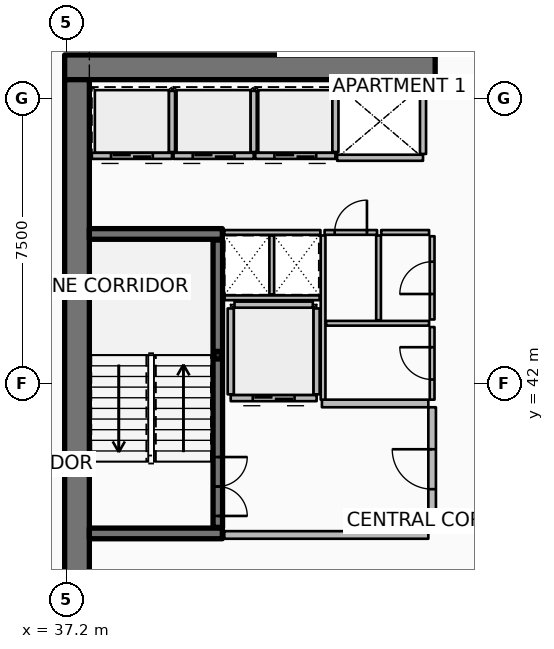
"""IFC4 building model, lengths in metres.
Left out: names, types, materials, properties, quantities, classifications, styles, units other than length and angle.
Written with IfcOpenShell. Run it as: python <this file> out.ifc"""

import sys

from ifc_helpers import new_model, si_unit, direction, frame, frame_2d, origin, origin_2d, place, context, subcontext, project, spatial, rectangle, hollow_rectangle, extrude, element, fill, save


model = new_model("IFC4")
c1 = context("Model", 3, precision=1e-05, world=origin(), true_north=direction((0.0, 1.0)))
c2 = subcontext(c1, "Body", "Model", "MODEL_VIEW")
j1 = project(units=[si_unit("LENGTHUNIT", "METRE"), si_unit("PLANEANGLEUNIT", "RADIAN")], contexts=[c1])
p1 = place(None, origin())
s1 = spatial("IfcSite", under=j1, at=p1, CompositionType="ELEMENT")
p2 = place(p1, origin())
s2 = spatial("IfcBuilding", under=s1, at=p2, CompositionType="ELEMENT")
p3 = place(p2, frame((0.0, 0.0, 202.8)))
s3 = spatial("IfcBuildingStorey", under=s2, at=p3, CompositionType="ELEMENT", Elevation=202.8)
p4 = place(p3, frame((37.15, 50.325, 0.0), z_axis=(0.0, 0.0, 1.0), x_axis=(1.0, 0.0, 0.0)))
e1 = element("IfcWall", 1, at=p4, inside=s3, PredefinedType="SHEAR", context=c2, shape_type="SweptSolid", body=[
    extrude(rectangle(XDim=9.75, YDim=0.65, at=frame_2d((4.875, 0.0))), origin(), (0.0, 0.0, 1.0), 3.75),
])
p5 = place(p3, frame((37.475, 34.0, 0.0), z_axis=(0.0, 0.0, 1.0), x_axis=(0.0, 1.0, 0.0)))
e2 = element("IfcWall", 2, at=p5, inside=s3, PredefinedType="SHEAR", context=c2, shape_type="SweptSolid", body=[
    extrude(rectangle(XDim=16.0, YDim=0.65, at=frame_2d((8.0, 0.0))), origin(), (0.0, 0.0, 1.0), 3.75),
])
for number, where, z_axis, x_axis in (
    (3, (37.8, 38.06, 0.0), (0.0, 0.0, 1.0), (1.0, 0.0, 0.0)),
    (4, (37.8, 45.94, 0.0), (0.0, 0.0, 1.0), (1.0, 0.0, 0.0)),
):
    element("IfcWall", number, at=place(p3, frame(where, z_axis=z_axis, x_axis=x_axis)), inside=s3, PredefinedType="SHEAR", context=c2, shape_type="SweptSolid", body=[
        extrude(rectangle(XDim=3.5, YDim=0.28, at=frame_2d((1.75, 0.0))), origin(), (0.0, 0.0, 1.0), 3.75),
    ])
p6 = place(p3, frame((41.18, 42.75, 0.0), z_axis=(0.0, 0.0, 1.0), x_axis=(1.0, 0.0, 0.0)))
e5 = element("IfcColumn", 5, at=p6, inside=s3, PredefinedType="COLUMN", context=c2, shape_type="SweptSolid", body=[
    extrude(hollow_rectangle(XDim=0.2, YDim=0.2, WallThickness=0.01, InnerFilletRadius=0.01, OuterFilletRadius=0.02, at=origin_2d()), origin(), (0.0, 0.0, 1.0), 1.67),
])
p7 = place(p3, frame((41.18, 38.22, 0.0), z_axis=(0.0, 0.0, 1.0), x_axis=(0.0, 1.0, 0.0)))
e6 = element("IfcWall", 6, at=p7, inside=s3, PredefinedType="SOLIDWALL", context=c2, shape_type="SweptSolid", body=[
    extrude(rectangle(XDim=7.56, YDim=0.25, at=frame_2d((3.78, 0.0))), origin(), (0.0, 0.0, 1.0), 3.5),
])
p8 = place(p7, frame((0.3, 0.0, 0.0)))
e7 = element("IfcOpeningElement", 7, at=p8, cuts=e6, PredefinedType="OPENING", context=c2, shape_type="SweptSolid", body=[
    extrude(rectangle(XDim=1.55, YDim=2.15, at=frame_2d((0.775, 1.075))), frame((0.0, 0.135, 0.0), z_axis=(0.0, -1.0, 0.0), x_axis=(1.0, 0.0, 0.0)), (0.0, 0.0, 1.0), 0.27),
])
p9 = place(p3, frame((39.975, 47.995, 0.0), z_axis=(0.0, 0.0, 1.0), x_axis=(-1.0, 0.0, 0.0)))
e8 = element("IfcWall", 8, at=p9, inside=s3, PredefinedType="PARTITIONING", context=c2, shape_type="SweptSolid", body=[
    extrude(rectangle(XDim=2.11, YDim=0.16, at=frame_2d((1.055, 0.0))), origin(), (0.0, 0.0, 1.0), 3.5),
])
p10 = place(p9, frame((0.505, 0.0, 0.0)))
e9 = element("IfcOpeningElement", 9, at=p10, cuts=e8, PredefinedType="OPENING", context=c2, shape_type="SweptSolid", body=[
    extrude(rectangle(XDim=1.1, YDim=2.1, at=frame_2d((0.55, 1.05))), frame((0.0, 0.09, 0.0), z_axis=(0.0, -1.0, 0.0), x_axis=(1.0, 0.0, 0.0)), (0.0, 0.0, 1.0), 0.18),
])
p11 = place(p3, frame((39.975, 48.095, 0.0), z_axis=(0.0, 0.0, 1.0), x_axis=(0.0, 1.0, 0.0)))
e10 = element("IfcWall", 10, at=p11, inside=s3, PredefinedType="PARTITIONING", context=c2, shape_type="SweptSolid", body=[
    extrude(rectangle(XDim=1.61, YDim=0.16, at=frame_2d((0.805, 0.0))), origin(), (0.0, 0.0, 1.0), 3.5),
])
p12 = place(p3, frame((42.125, 47.995, 0.0), z_axis=(0.0, 0.0, 1.0), x_axis=(-1.0, 0.0, 0.0)))
e11 = element("IfcWall", 11, at=p12, inside=s3, PredefinedType="PARTITIONING", context=c2, shape_type="SweptSolid", body=[
    extrude(rectangle(XDim=2.11, YDim=0.16, at=frame_2d((1.055, 0.0))), origin(), (0.0, 0.0, 1.0), 3.5),
])
p13 = place(p12, frame((0.505, 0.0, 0.0)))
e12 = element("IfcOpeningElement", 12, at=p13, cuts=e11, PredefinedType="OPENING", context=c2, shape_type="SweptSolid", body=[
    extrude(rectangle(XDim=1.1, YDim=2.1, at=frame_2d((0.55, 1.05))), frame((0.0, 0.09, 0.0), z_axis=(0.0, -1.0, 0.0), x_axis=(1.0, 0.0, 0.0)), (0.0, 0.0, 1.0), 0.18),
])
p14 = place(p3, frame((42.125, 48.095, 0.0), z_axis=(0.0, 0.0, 1.0), x_axis=(0.0, 1.0, 0.0)))
e13 = element("IfcWall", 13, at=p14, inside=s3, PredefinedType="PARTITIONING", context=c2, shape_type="SweptSolid", body=[
    extrude(rectangle(XDim=1.61, YDim=0.16, at=frame_2d((0.805, 0.0))), origin(), (0.0, 0.0, 1.0), 3.5),
])
p15 = place(p3, frame((44.275, 47.995, 0.0), z_axis=(0.0, 0.0, 1.0), x_axis=(-1.0, 0.0, 0.0)))
e14 = element("IfcWall", 14, at=p15, inside=s3, PredefinedType="PARTITIONING", context=c2, shape_type="SweptSolid", body=[
    extrude(rectangle(XDim=2.11, YDim=0.16, at=frame_2d((1.055, 0.0))), origin(), (0.0, 0.0, 1.0), 3.5),
])
p16 = place(p15, frame((0.505, 0.0, 0.0)))
e15 = element("IfcOpeningElement", 15, at=p16, cuts=e14, PredefinedType="OPENING", context=c2, shape_type="SweptSolid", body=[
    extrude(rectangle(XDim=1.1, YDim=2.1, at=frame_2d((0.55, 1.05))), frame((0.0, 0.09, 0.0), z_axis=(0.0, -1.0, 0.0), x_axis=(1.0, 0.0, 0.0)), (0.0, 0.0, 1.0), 0.18),
])
p17 = place(p3, frame((44.275, 48.095, 0.0), z_axis=(0.0, 0.0, 1.0), x_axis=(0.0, 1.0, 0.0)))
e16 = element("IfcWall", 16, at=p17, inside=s3, PredefinedType="PARTITIONING", context=c2, shape_type="SweptSolid", body=[
    extrude(rectangle(XDim=1.61, YDim=0.16, at=frame_2d((0.805, 0.0))), origin(), (0.0, 0.0, 1.0), 3.5),
])
p18 = place(p3, frame((46.58, 47.945, 0.0), z_axis=(0.0, 0.0, 1.0), x_axis=(-1.0, 0.0, 0.0)))
e17 = element("IfcWall", 17, at=p18, inside=s3, PredefinedType="PARTITIONING", context=c2, shape_type="SweptSolid", body=[
    extrude(rectangle(XDim=2.26, YDim=0.16, at=frame_2d((1.13, 0.0))), origin(), (0.0, 0.0, 1.0), 3.5),
])
p19 = place(p3, frame((46.58, 48.045, 0.0), z_axis=(0.0, 0.0, 1.0), x_axis=(0.0, 1.0, 0.0)))
e18 = element("IfcWall", 18, at=p19, inside=s3, PredefinedType="PARTITIONING", context=c2, shape_type="SweptSolid", body=[
    extrude(rectangle(XDim=1.71, YDim=0.16, at=frame_2d((0.855, 0.0))), origin(), (0.0, 0.0, 1.0), 3.5),
])
p20 = place(p3, frame((43.78, 41.62, 0.0), z_axis=(0.0, 0.0, 1.0), x_axis=(-1.0, 0.0, 0.0)))
e19 = element("IfcWall", 19, at=p20, inside=s3, PredefinedType="PARTITIONING", context=c2, shape_type="SweptSolid", body=[
    extrude(rectangle(XDim=2.26, YDim=0.16, at=frame_2d((1.13, 0.0))), origin(), (0.0, 0.0, 1.0), 3.5),
])
p21 = place(p20, frame((0.58, 0.0, 0.0)))
e20 = element("IfcOpeningElement", 20, at=p21, cuts=e19, PredefinedType="OPENING", context=c2, shape_type="SweptSolid", body=[
    extrude(rectangle(XDim=1.1, YDim=2.1, at=frame_2d((0.55, 1.05))), frame((0.0, 0.09, 0.0), z_axis=(0.0, -1.0, 0.0), x_axis=(1.0, 0.0, 0.0)), (0.0, 0.0, 1.0), 0.18),
])
for number, where, z_axis, x_axis in (
    (21, (43.78, 41.72, 0.0), (0.0, 0.0, 1.0), (0.0, 1.0, 0.0)),
    (22, (41.52, 41.72, 0.0), (0.0, 0.0, 1.0), (0.0, 1.0, 0.0)),
):
    element("IfcWall", number, at=place(p3, frame(where, z_axis=z_axis, x_axis=x_axis)), inside=s3, PredefinedType="PARTITIONING", context=c2, shape_type="SweptSolid", body=[
        extrude(rectangle(XDim=2.26, YDim=0.16, at=frame_2d((1.13, 0.0))), origin(), (0.0, 0.0, 1.0), 3.5),
    ])
p22 = place(p3, frame((41.62, 44.08, 0.0), z_axis=(0.0, 0.0, 1.0), x_axis=(1.0, 0.0, 0.0)))
e23 = element("IfcWall", 23, at=p22, inside=s3, PredefinedType="PARTITIONING", context=c2, shape_type="SweptSolid", body=[
    extrude(rectangle(XDim=2.06, YDim=0.16, at=frame_2d((1.03, 0.0))), origin(), (0.0, 0.0, 1.0), 3.5),
])
p23 = place(p3, frame((41.35, 38.02, 0.0), z_axis=(0.0, 0.0, 1.0), x_axis=(1.0, 0.0, 0.0)))
e24 = element("IfcWall", 24, at=p23, inside=s3, PredefinedType="PARTITIONING", context=c2, shape_type="SweptSolid", body=[
    extrude(rectangle(XDim=5.37, YDim=0.2, at=frame_2d((2.685, 0.0))), origin(), (0.0, 0.0, 1.0), 3.5),
])
p24 = place(p3, frame((43.92, 41.48, 0.0), z_axis=(0.0, 0.0, 1.0), x_axis=(1.0, 0.0, 0.0)))
e25 = element("IfcWall", 25, at=p24, inside=s3, PredefinedType="PARTITIONING", context=c2, shape_type="SweptSolid", body=[
    extrude(rectangle(XDim=2.8, YDim=0.2, at=frame_2d((1.4, 0.0))), origin(), (0.0, 0.0, 1.0), 3.5),
])
p25 = place(p3, frame((46.82, 38.12, 0.0), z_axis=(0.0, 0.0, 1.0), x_axis=(0.0, 1.0, 0.0)))
e26 = element("IfcWall", 26, at=p25, inside=s3, PredefinedType="PARTITIONING", context=c2, shape_type="SweptSolid", body=[
    extrude(rectangle(XDim=3.26, YDim=0.2, at=frame_2d((1.63, 0.0))), origin(), (0.0, 0.0, 1.0), 3.5),
])
p26 = place(p25, frame((1.105, 0.0, 0.0)))
e27 = element("IfcOpeningElement", 27, at=p26, cuts=e26, PredefinedType="OPENING", context=c2, shape_type="SweptSolid", body=[
    extrude(rectangle(XDim=1.05, YDim=2.1, at=frame_2d((0.525, 1.05))), frame((0.0, 0.11, 0.0), z_axis=(0.0, -1.0, 0.0), x_axis=(1.0, 0.0, 0.0)), (0.0, 0.0, 1.0), 0.22),
])
p27 = place(p3, frame((41.36, 44.26, 0.0), z_axis=(0.0, 0.0, 1.0), x_axis=(1.0, 0.0, 0.0)))
e28 = element("IfcWall", 28, at=p27, inside=s3, PredefinedType="PARTITIONING", context=c2, shape_type="SweptSolid", body=[
    extrude(rectangle(XDim=2.5, YDim=0.125, at=frame_2d((1.25, 0.0))), origin(), (0.0, 0.0, 1.0), 2.94),
])
p28 = place(p3, frame((42.6, 44.35, 0.0), z_axis=(0.0, 0.0, 1.0), x_axis=(0.0, 1.0, 0.0)))
e29 = element("IfcWall", 29, at=p28, inside=s3, PredefinedType="PARTITIONING", context=c2, shape_type="SweptSolid", body=[
    extrude(rectangle(XDim=1.55, YDim=0.125, at=frame_2d((0.775, 0.0))), origin(), (0.0, 0.0, 1.0), 2.94),
])
p29 = place(p3, frame((43.95, 41.58, 0.0), z_axis=(0.0, 0.0, 1.0), x_axis=(0.0, 1.0, 0.0)))
e30 = element("IfcWall", 30, at=p29, inside=s3, PredefinedType="PARTITIONING", context=c2, shape_type="SweptSolid", body=[
    extrude(rectangle(XDim=4.32, YDim=0.125, at=frame_2d((2.16, 0.0))), origin(), (0.0, 0.0, 1.0), 2.94),
])
p30 = place(p3, frame((44.03, 43.59, 0.0), z_axis=(0.0, 0.0, 1.0), x_axis=(1.0, 0.0, 0.0)))
e31 = element("IfcWall", 31, at=p30, inside=s3, PredefinedType="PARTITIONING", context=c2, shape_type="SweptSolid", body=[
    extrude(rectangle(XDim=2.71, YDim=0.125, at=frame_2d((1.355, 0.0))), origin(), (0.0, 0.0, 1.0), 2.94),
])
p31 = place(p3, frame((45.41, 43.67, 0.0), z_axis=(0.0, 0.0, 1.0), x_axis=(0.0, 1.0, 0.0)))
e32 = element("IfcWall", 32, at=p31, inside=s3, PredefinedType="PARTITIONING", context=c2, shape_type="SweptSolid", body=[
    extrude(rectangle(XDim=2.23, YDim=0.125, at=frame_2d((1.115, 0.0))), origin(), (0.0, 0.0, 1.0), 2.94),
])
p32 = place(p3, frame((46.82, 41.58, 0.0), z_axis=(0.0, 0.0, 1.0), x_axis=(0.0, 1.0, 0.0)))
e33 = element("IfcWall", 33, at=p32, inside=s3, PredefinedType="PARTITIONING", context=c2, shape_type="SweptSolid", body=[
    extrude(rectangle(XDim=1.91, YDim=0.125, at=frame_2d((0.955, 0.0))), origin(), (0.0, 0.0, 1.0), 2.94),
])
p33 = place(p32, frame((0.53, 0.0, 0.0)))
e34 = element("IfcOpeningElement", 34, at=p33, cuts=e33, PredefinedType="OPENING", context=c2, shape_type="SweptSolid", body=[
    extrude(rectangle(XDim=0.85, YDim=2.06, at=frame_2d((0.425, 1.03))), frame((0.0, 0.073, 0.0), z_axis=(0.0, -1.0, 0.0), x_axis=(1.0, 0.0, 0.0)), (0.0, 0.0, 1.0), 0.145),
])
p34 = place(p3, frame((46.82, 43.69, 0.0), z_axis=(0.0, 0.0, 1.0), x_axis=(0.0, 1.0, 0.0)))
e35 = element("IfcWall", 35, at=p34, inside=s3, PredefinedType="PARTITIONING", context=c2, shape_type="SweptSolid", body=[
    extrude(rectangle(XDim=2.19, YDim=0.125, at=frame_2d((1.095, 0.0))), origin(), (0.0, 0.0, 1.0), 2.94),
])
p35 = place(p34, frame((0.67, 0.0, 0.0)))
e36 = element("IfcOpeningElement", 36, at=p35, cuts=e35, PredefinedType="OPENING", context=c2, shape_type="SweptSolid", body=[
    extrude(rectangle(XDim=0.85, YDim=2.06, at=frame_2d((0.425, 1.03))), frame((0.0, 0.073, 0.0), z_axis=(0.0, -1.0, 0.0), x_axis=(1.0, 0.0, 0.0)), (0.0, 0.0, 1.0), 0.145),
])
p36 = place(p3, frame((41.35, 45.98, 0.0), z_axis=(0.0, 0.0, 1.0), x_axis=(1.0, 0.0, 0.0)))
e37 = element("IfcWall", 37, at=p36, inside=s3, PredefinedType="PARTITIONING", context=c2, shape_type="SweptSolid", body=[
    extrude(rectangle(XDim=2.53, YDim=0.125, at=frame_2d((1.265, 0.0))), origin(), (0.0, 0.0, 1.0), 2.94),
])
p37 = place(p3, frame((43.99, 45.98, 0.0), z_axis=(0.0, 0.0, 1.0), x_axis=(1.0, 0.0, 0.0)))
e38 = element("IfcWall", 38, at=p37, inside=s3, PredefinedType="PARTITIONING", context=c2, shape_type="SweptSolid", body=[
    extrude(rectangle(XDim=1.38, YDim=0.125, at=frame_2d((0.69, 0.0))), origin(), (0.0, 0.0, 1.0), 2.94),
])
p38 = place(p37, frame((0.265, 0.0, 0.0)))
e39 = element("IfcOpeningElement", 39, at=p38, cuts=e38, PredefinedType="OPENING", context=c2, shape_type="SweptSolid", body=[
    extrude(rectangle(XDim=0.85, YDim=2.06, at=frame_2d((0.425, 1.03))), frame((0.0, 0.073, 0.0), z_axis=(0.0, -1.0, 0.0), x_axis=(1.0, 0.0, 0.0)), (0.0, 0.0, 1.0), 0.145),
])
p39 = place(p3, frame((45.48, 45.98, 0.0), z_axis=(0.0, 0.0, 1.0), x_axis=(1.0, 0.0, 0.0)))
e40 = element("IfcWall", 40, at=p39, inside=s3, PredefinedType="PARTITIONING", context=c2, shape_type="SweptSolid", body=[
    extrude(rectangle(XDim=1.26, YDim=0.125, at=frame_2d((0.63, 0.0))), origin(), (0.0, 0.0, 1.0), 2.94),
])
p40 = place(p8, origin())
e41 = element("IfcDoor", 41, at=p40, inside=s3, OperationType="DOUBLE_DOOR_SINGLE_SWING", PredefinedType="DOOR", context=c2, shape_type="SweptSolid", body=[
    extrude(rectangle(XDim=1.55, YDim=2.15, at=frame_2d((0.775, 1.075))), frame((0.0, 0.025, 0.0), z_axis=(0.0, -1.0, 0.0), x_axis=(1.0, 0.0, 0.0)), (0.0, 0.0, 1.0), 0.05),
])
fill(e7, e41)
p41 = place(p10, origin())
e42 = element("IfcDoor", 42, at=p41, inside=s3, OperationType="DOUBLE_DOOR_SLIDING", PredefinedType="DOOR", context=c2, shape_type="SweptSolid", body=[
    extrude(rectangle(XDim=1.1, YDim=2.1, at=frame_2d((0.55, 1.05))), frame((0.0, 0.025, 0.0), z_axis=(0.0, -1.0, 0.0), x_axis=(1.0, 0.0, 0.0)), (0.0, 0.0, 1.0), 0.05),
])
fill(e9, e42)
p42 = place(p13, origin())
e43 = element("IfcDoor", 43, at=p42, inside=s3, OperationType="DOUBLE_DOOR_SLIDING", PredefinedType="DOOR", context=c2, shape_type="SweptSolid", body=[
    extrude(rectangle(XDim=1.1, YDim=2.1, at=frame_2d((0.55, 1.05))), frame((0.0, 0.025, 0.0), z_axis=(0.0, -1.0, 0.0), x_axis=(1.0, 0.0, 0.0)), (0.0, 0.0, 1.0), 0.05),
])
fill(e12, e43)
p43 = place(p16, origin())
e44 = element("IfcDoor", 44, at=p43, inside=s3, OperationType="DOUBLE_DOOR_SLIDING", PredefinedType="DOOR", context=c2, shape_type="SweptSolid", body=[
    extrude(rectangle(XDim=1.1, YDim=2.1, at=frame_2d((0.55, 1.05))), frame((0.0, 0.025, 0.0), z_axis=(0.0, -1.0, 0.0), x_axis=(1.0, 0.0, 0.0)), (0.0, 0.0, 1.0), 0.05),
])
fill(e15, e44)
p44 = place(p21, origin())
e45 = element("IfcDoor", 45, at=p44, inside=s3, OperationType="DOUBLE_DOOR_SLIDING", PredefinedType="DOOR", context=c2, shape_type="SweptSolid", body=[
    extrude(rectangle(XDim=1.1, YDim=2.1, at=frame_2d((0.55, 1.05))), frame((0.0, 0.025, 0.0), z_axis=(0.0, -1.0, 0.0), x_axis=(1.0, 0.0, 0.0)), (0.0, 0.0, 1.0), 0.05),
])
fill(e20, e45)
p45 = place(p26, origin())
e46 = element("IfcDoor", 46, at=p45, inside=s3, OperationType="SINGLE_SWING_RIGHT", PredefinedType="DOOR", context=c2, shape_type="SweptSolid", body=[
    extrude(rectangle(XDim=1.05, YDim=2.1, at=frame_2d((0.525, 1.05))), frame((0.0, 0.025, 0.0), z_axis=(0.0, -1.0, 0.0), x_axis=(1.0, 0.0, 0.0)), (0.0, 0.0, 1.0), 0.05),
])
fill(e27, e46)
p46 = place(p33, origin())
e47 = element("IfcDoor", 47, at=p46, inside=s3, OperationType="SINGLE_SWING_RIGHT", PredefinedType="DOOR", context=c2, shape_type="SweptSolid", body=[
    extrude(rectangle(XDim=0.85, YDim=2.06, at=frame_2d((0.425, 1.03))), frame((0.0, 0.025, 0.0), z_axis=(0.0, -1.0, 0.0), x_axis=(1.0, 0.0, 0.0)), (0.0, 0.0, 1.0), 0.05),
])
fill(e34, e47)
p47 = place(p35, origin())
e48 = element("IfcDoor", 48, at=p47, inside=s3, OperationType="SINGLE_SWING_LEFT", PredefinedType="DOOR", context=c2, shape_type="SweptSolid", body=[
    extrude(rectangle(XDim=0.85, YDim=2.06, at=frame_2d((0.425, 1.03))), frame((0.0, 0.025, 0.0), z_axis=(0.0, -1.0, 0.0), x_axis=(1.0, 0.0, 0.0)), (0.0, 0.0, 1.0), 0.05),
])
fill(e36, e48)
p48 = place(p38, origin())
e49 = element("IfcDoor", 49, at=p48, inside=s3, OperationType="SINGLE_SWING_RIGHT", PredefinedType="DOOR", context=c2, shape_type="SweptSolid", body=[
    extrude(rectangle(XDim=0.85, YDim=2.06, at=frame_2d((0.425, 1.03))), frame((0.0, 0.025, 0.0), z_axis=(0.0, -1.0, 0.0), x_axis=(1.0, 0.0, 0.0)), (0.0, 0.0, 1.0), 0.05),
])
fill(e39, e49)
save(model, sys.argv[1])
